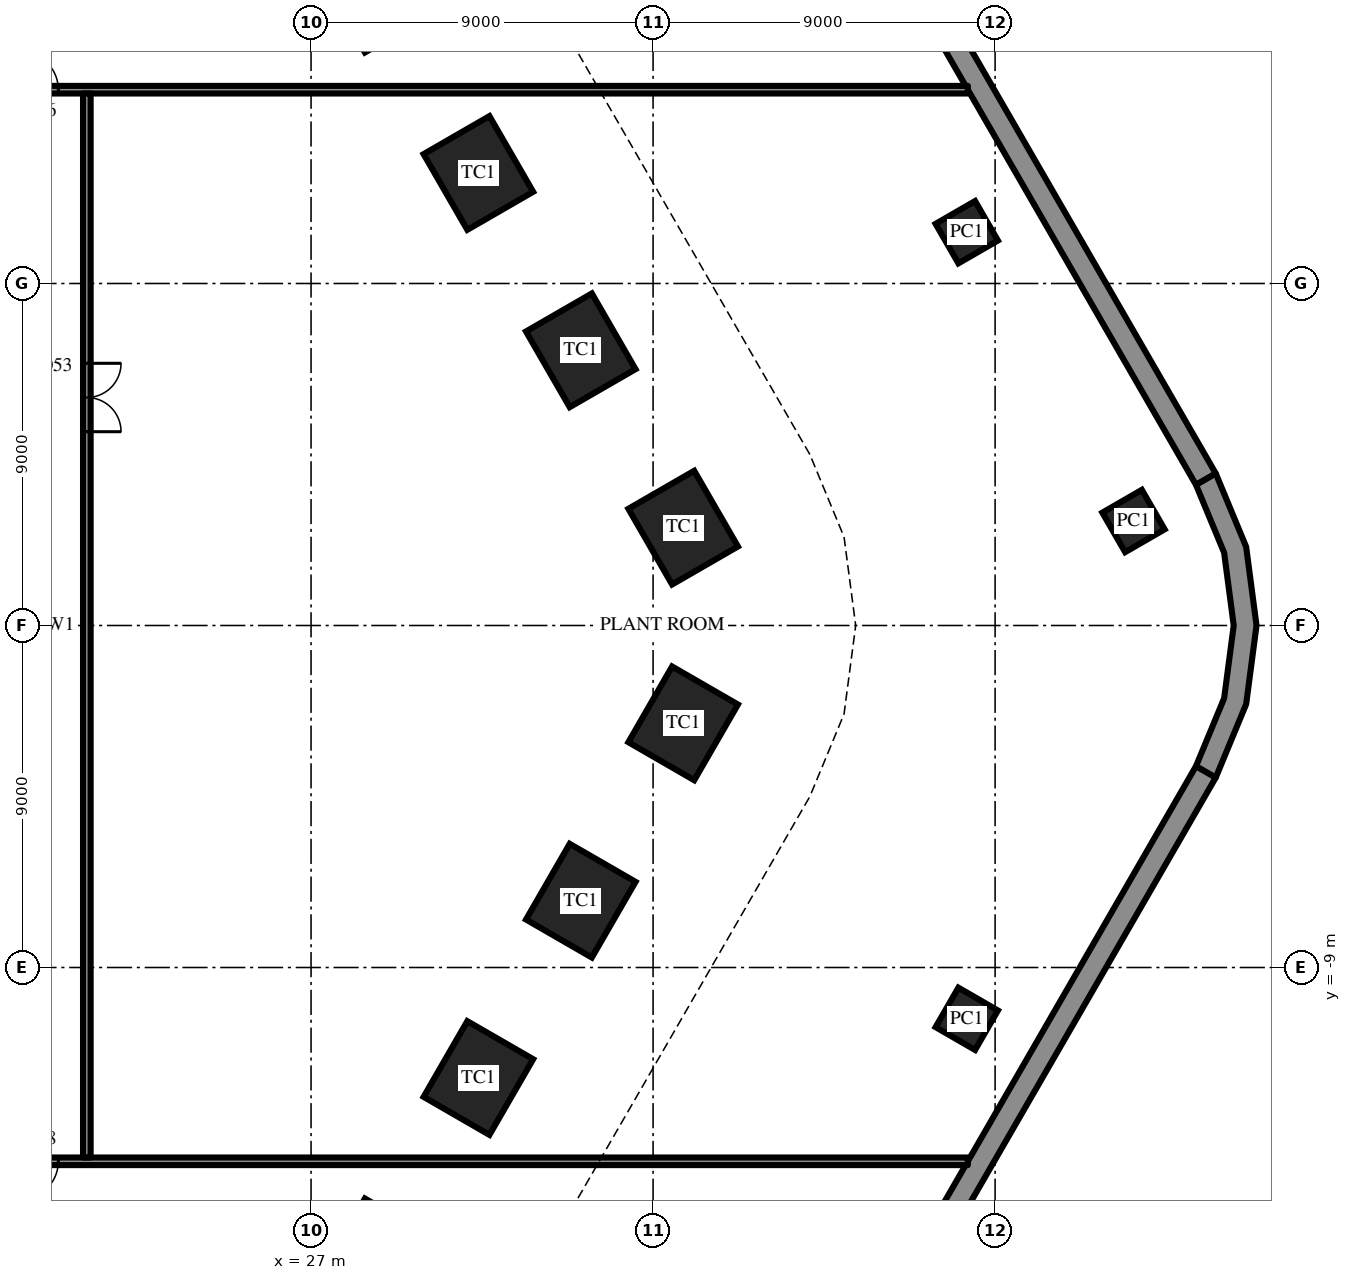
"""IFC4 building model, lengths in metres.
Left out: names, types, materials, properties, quantities, classifications, styles, units other than length and angle.
Written with IfcOpenShell. Run it as: python <this file> out.ifc"""

import sys

from ifc_helpers import new_model, si_unit, direction, frame, frame_2d, origin, origin_2d, place, context, subcontext, project, spatial, polyline, rectangle, outline, extrude, element, fill, save


model = new_model("IFC4")
c1 = context("Model", 3, precision=1e-05, world=origin(), true_north=direction((0.0, 1.0)))
c2 = subcontext(c1, "Body", "Model", "MODEL_VIEW")
j1 = project(units=[si_unit("LENGTHUNIT", "METRE"), si_unit("PLANEANGLEUNIT", "RADIAN")], contexts=[c1])
p1 = place(None, origin())
s1 = spatial("IfcSite", under=j1, at=p1, CompositionType="ELEMENT")
p2 = place(p1, origin())
s2 = spatial("IfcBuilding", under=s1, at=p2, CompositionType="ELEMENT")
p3 = place(p2, frame((0.0, 0.0, -9.0)))
s3 = spatial("IfcBuildingStorey", under=s2, at=p3, CompositionType="ELEMENT", Elevation=-9.0)
for number, where, z_axis, x_axis in (
    (1, (36.792, 2.575, 0.0), (0.0, 0.0, 1.0), (-0.5, 0.866, 0.0)),
    (2, (34.097, 7.242, 0.0), (0.0, 0.0, 1.0), (-0.5, 0.866, 0.0)),
    (3, (31.403, 11.908, 0.0), (0.0, 0.0, 1.0), (-0.5, 0.866, 0.0)),
    (4, (28.709, 16.575, 0.0), (0.0, 0.0, 1.0), (-0.5, 0.866, 0.0)),
    (5, (28.709, -16.575, 0.0), (0.0, 0.0, 1.0), (0.5, 0.866, 0.0)),
    (6, (31.403, -11.908, 0.0), (0.0, 0.0, 1.0), (0.5, 0.866, 0.0)),
    (7, (34.097, -7.242, 0.0), (0.0, 0.0, 1.0), (0.5, 0.866, 0.0)),
    (8, (36.792, -2.575, 0.0), (0.0, 0.0, 1.0), (0.5, 0.866, 0.0)),
):
    element("IfcColumn", number, at=place(p3, frame(where, z_axis=z_axis, x_axis=x_axis)), inside=s3, PredefinedType="COLUMN", context=c2, shape_type="SweptSolid", body=[
        extrude(rectangle(XDim=2.3, YDim=2.0, at=origin_2d()), origin(), (0.0, 0.0, 1.0), 4.5),
    ])
for number, where, z_axis, x_axis in (
    (9, (48.642, 2.75, 0.0), (0.0, 0.0, 1.0), (-0.5, 0.866, 0.0)),
    (10, (44.254, 10.35, 0.0), (0.0, 0.0, 1.0), (-0.5, 0.866, 0.0)),
    (11, (44.254, -10.35, 0.0), (0.0, 0.0, 1.0), (0.5, 0.866, 0.0)),
):
    element("IfcColumn", number, at=place(p3, frame(where, z_axis=z_axis, x_axis=x_axis)), inside=s3, PredefinedType="COLUMN", context=c2, shape_type="SweptSolid", body=[
        extrude(rectangle(XDim=1.2, YDim=1.2, at=origin_2d()), origin(), (0.0, 0.0, 1.0), 4.5),
    ])
for number, where, z_axis, x_axis in (
    (12, (50.547, 3.85, 0.0), (0.0, 0.0, 1.0), (-0.5, 0.866, 0.0)),
    (13, (28.608, -41.85, 0.0), (0.0, 0.0, 1.0), (0.5, 0.866, 0.0)),
):
    element("IfcWall", number, at=place(p3, frame(where, z_axis=z_axis, x_axis=x_axis)), inside=s3, PredefinedType="SOLIDWALL", context=c2, shape_type="SweptSolid", body=[
        extrude(rectangle(XDim=43.879, YDim=0.6, at=frame_2d((21.939, 0.0))), origin(), (0.0, 0.0, 1.0), 4.5),
    ])
p4 = place(p3, origin())
e14 = element("IfcWall", 14, at=p4, inside=s3, PredefinedType="SOLIDWALL", context=c2, shape_type="SweptSolid", body=[
    extrude(outline(polyline([(50.807, -4.0), (51.606, -2.071), (51.879, 0.0), (51.606, 2.071), (50.807, 4.0), (50.287, 3.7), (51.026, 1.915), (51.279, 0.0), (51.026, -1.915), (50.287, -3.7), (50.807, -4.0)])), origin(), (0.0, 0.0, 1.0), 4.5),
])
p5 = place(p3, frame((-44.283, 14.1, 0.0), z_axis=(0.0, 0.0, 1.0), x_axis=(1.0, 0.0, 0.0)))
e15 = element("IfcWall", 15, at=p5, inside=s3, PredefinedType="PARTITIONING", context=c2, shape_type="SweptSolid", body=[
    extrude(rectangle(XDim=88.565, YDim=0.2, at=frame_2d((44.283, 0.0))), origin(), (0.0, 0.0, 1.0), 4.15),
])
p6 = place(p5, frame((38.383, 0.0, 0.0)))
e16 = element("IfcOpeningElement", 16, at=p6, cuts=e15, PredefinedType="OPENING", context=c2, shape_type="SweptSolid", body=[
    extrude(rectangle(XDim=1.8, YDim=2.4, at=frame_2d((0.9, 1.2))), frame((0.0, 0.11, 0.0), z_axis=(0.0, -1.0, 0.0), x_axis=(1.0, 0.0, 0.0)), (0.0, 0.0, 1.0), 0.22),
])
p7 = place(p5, frame((55.783, 0.0, 0.0)))
e17 = element("IfcOpeningElement", 17, at=p7, cuts=e15, PredefinedType="OPENING", context=c2, shape_type="SweptSolid", body=[
    extrude(rectangle(XDim=1.0, YDim=2.2, at=frame_2d((0.5, 1.1))), frame((0.0, 0.11, 0.0), z_axis=(0.0, -1.0, 0.0), x_axis=(1.0, 0.0, 0.0)), (0.0, 0.0, 1.0), 0.22),
])
p8 = place(p5, frame((46.083, 0.0, 0.0)))
e18 = element("IfcOpeningElement", 18, at=p8, cuts=e15, PredefinedType="OPENING", context=c2, shape_type="SweptSolid", body=[
    extrude(rectangle(XDim=1.8, YDim=2.4, at=frame_2d((0.9, 1.2))), frame((0.0, 0.11, 0.0), z_axis=(0.0, -1.0, 0.0), x_axis=(1.0, 0.0, 0.0)), (0.0, 0.0, 1.0), 0.22),
])
p9 = place(p5, frame((63.633, 0.0, 0.0)))
e19 = element("IfcOpeningElement", 19, at=p9, cuts=e15, PredefinedType="OPENING", context=c2, shape_type="SweptSolid", body=[
    extrude(rectangle(XDim=1.0, YDim=2.2, at=frame_2d((0.5, 1.1))), frame((0.0, 0.11, 0.0), z_axis=(0.0, -1.0, 0.0), x_axis=(1.0, 0.0, 0.0)), (0.0, 0.0, 1.0), 0.22),
])
p10 = place(p3, frame((-44.283, -14.1, 0.0), z_axis=(0.0, 0.0, 1.0), x_axis=(1.0, 0.0, 0.0)))
e20 = element("IfcWall", 20, at=p10, inside=s3, PredefinedType="PARTITIONING", context=c2, shape_type="SweptSolid", body=[
    extrude(rectangle(XDim=88.565, YDim=0.2, at=frame_2d((44.283, 0.0))), origin(), (0.0, 0.0, 1.0), 4.15),
])
p11 = place(p10, frame((31.383, 0.0, 0.0)))
e21 = element("IfcOpeningElement", 21, at=p11, cuts=e20, PredefinedType="OPENING", context=c2, shape_type="SweptSolid", body=[
    extrude(rectangle(XDim=1.8, YDim=2.4, at=frame_2d((0.9, 1.2))), frame((0.0, 0.11, 0.0), z_axis=(0.0, -1.0, 0.0), x_axis=(1.0, 0.0, 0.0)), (0.0, 0.0, 1.0), 0.22),
])
p12 = place(p10, frame((49.883, 0.0, 0.0)))
e22 = element("IfcOpeningElement", 22, at=p12, cuts=e20, PredefinedType="OPENING", context=c2, shape_type="SweptSolid", body=[
    extrude(rectangle(XDim=1.8, YDim=2.4, at=frame_2d((0.9, 1.2))), frame((0.0, 0.11, 0.0), z_axis=(0.0, -1.0, 0.0), x_axis=(1.0, 0.0, 0.0)), (0.0, 0.0, 1.0), 0.22),
])
p13 = place(p10, frame((46.083, 0.0, 0.0)))
e23 = element("IfcOpeningElement", 23, at=p13, cuts=e20, PredefinedType="OPENING", context=c2, shape_type="SweptSolid", body=[
    extrude(rectangle(XDim=1.8, YDim=2.4, at=frame_2d((0.9, 1.2))), frame((0.0, 0.11, 0.0), z_axis=(0.0, -1.0, 0.0), x_axis=(1.0, 0.0, 0.0)), (0.0, 0.0, 1.0), 0.22),
])
p14 = place(p10, frame((63.633, 0.0, 0.0)))
e24 = element("IfcOpeningElement", 24, at=p14, cuts=e20, PredefinedType="OPENING", context=c2, shape_type="SweptSolid", body=[
    extrude(rectangle(XDim=1.0, YDim=2.2, at=frame_2d((0.5, 1.1))), frame((0.0, 0.11, 0.0), z_axis=(0.0, -1.0, 0.0), x_axis=(1.0, 0.0, 0.0)), (0.0, 0.0, 1.0), 0.22),
])
p15 = place(p3, frame((21.1, -14.0, 0.0), z_axis=(0.0, 0.0, 1.0), x_axis=(0.0, 1.0, 0.0)))
e25 = element("IfcWall", 25, at=p15, inside=s3, PredefinedType="PARTITIONING", context=c2, shape_type="SweptSolid", body=[
    extrude(rectangle(XDim=28.0, YDim=0.2, at=frame_2d((14.0, 0.0))), origin(), (0.0, 0.0, 1.0), 4.15),
])
p16 = place(p15, frame((19.1, 0.0, 0.0)))
e26 = element("IfcOpeningElement", 26, at=p16, cuts=e25, PredefinedType="OPENING", context=c2, shape_type="SweptSolid", body=[
    extrude(rectangle(XDim=1.8, YDim=2.4, at=frame_2d((0.9, 1.2))), frame((0.0, 0.11, 0.0), z_axis=(0.0, -1.0, 0.0), x_axis=(1.0, 0.0, 0.0)), (0.0, 0.0, 1.0), 0.22),
])
p17 = place(p9, origin())
e27 = element("IfcDoor", 27, at=p17, inside=s3, OperationType="SINGLE_SWING_RIGHT", PredefinedType="DOOR", context=c2, shape_type="SweptSolid", body=[
    extrude(rectangle(XDim=1.0, YDim=2.2, at=frame_2d((0.5, 1.1))), frame((0.0, 0.025, 0.0), z_axis=(0.0, -1.0, 0.0), x_axis=(1.0, 0.0, 0.0)), (0.0, 0.0, 1.0), 0.05),
])
fill(e19, e27)
p18 = place(p14, frame((1.0, 0.0, 0.0), z_axis=(0.0, 0.0, 1.0), x_axis=(-1.0, 0.0, 0.0)))
e28 = element("IfcDoor", 28, at=p18, inside=s3, OperationType="SINGLE_SWING_LEFT", PredefinedType="DOOR", context=c2, shape_type="SweptSolid", body=[
    extrude(rectangle(XDim=1.0, YDim=2.2, at=frame_2d((0.5, 1.1))), frame((0.0, 0.025, 0.0), z_axis=(0.0, -1.0, 0.0), x_axis=(1.0, 0.0, 0.0)), (0.0, 0.0, 1.0), 0.05),
])
fill(e24, e28)
p19 = place(p16, frame((1.8, 0.0, 0.0), z_axis=(0.0, 0.0, 1.0), x_axis=(-1.0, 0.0, 0.0)))
e29 = element("IfcDoor", 29, at=p19, inside=s3, OperationType="DOUBLE_DOOR_SINGLE_SWING", PredefinedType="DOOR", context=c2, shape_type="SweptSolid", body=[
    extrude(rectangle(XDim=1.8, YDim=2.4, at=frame_2d((0.9, 1.2))), frame((0.0, 0.025, 0.0), z_axis=(0.0, -1.0, 0.0), x_axis=(1.0, 0.0, 0.0)), (0.0, 0.0, 1.0), 0.05),
])
fill(e26, e29)
save(model, sys.argv[1])
